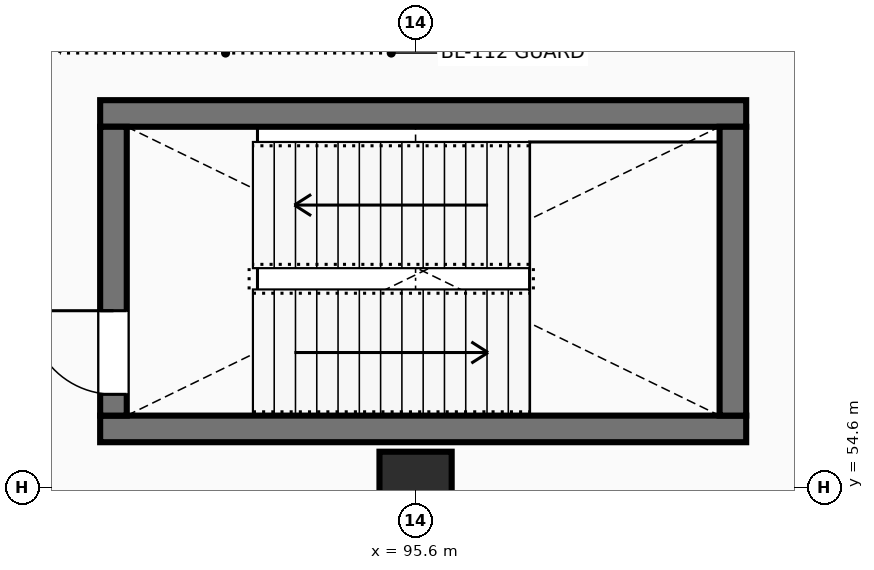
"""IFC4 building model, lengths in metres.
Left out: names, types, materials, properties, quantities, classifications, styles, units other than length and angle.
Written with IfcOpenShell. Run it as: python <this file> out.ifc"""

import sys

from ifc_helpers import new_model, si_unit, direction, frame, frame_2d, origin, origin_2d, place, context, subcontext, project, spatial, rectangle, extrude, element, fill, save


model = new_model("IFC4")
c1 = context("Model", 3, precision=1e-05, world=origin(), true_north=direction((0.0, 1.0)))
c2 = subcontext(c1, "Body", "Model", "MODEL_VIEW")
j1 = project(units=[si_unit("LENGTHUNIT", "METRE"), si_unit("PLANEANGLEUNIT", "RADIAN")], contexts=[c1])
p1 = place(None, origin())
s1 = spatial("IfcSite", under=j1, at=p1, CompositionType="ELEMENT")
p2 = place(p1, origin())
s2 = spatial("IfcBuilding", under=s1, at=p2, CompositionType="ELEMENT")
p3 = place(p2, frame((0.0, 0.0, 5.4)))
s3 = spatial("IfcBuildingStorey", under=s2, at=p3, CompositionType="ELEMENT", Elevation=5.4)
p4 = place(p3, frame((95.6, 54.6, 0.0), z_axis=(0.0, 0.0, 1.0), x_axis=(1.0, 0.0, 0.0)))
e1 = element("IfcColumn", 1, at=p4, inside=s3, PredefinedType="COLUMN", context=c2, shape_type="SweptSolid", body=[
    extrude(rectangle(XDim=0.95, YDim=0.95, at=origin_2d()), origin(), (0.0, 0.0, 1.0), 4.8),
])
for number, where, z_axis, x_axis in (
    (2, (91.45, 55.375, 0.0), (0.0, 0.0, 1.0), (1.0, 0.0, 0.0)),
    (3, (99.95, 59.525, 0.0), (0.0, 0.0, 1.0), (-1.0, 0.0, 0.0)),
):
    element("IfcWall", number, at=place(p3, frame(where, z_axis=z_axis, x_axis=x_axis)), inside=s3, PredefinedType="SHEAR", context=c2, shape_type="SweptSolid", body=[
        extrude(rectangle(XDim=8.5, YDim=0.35, at=frame_2d((4.25, 0.0))), origin(), (0.0, 0.0, 1.0), 4.48),
    ])
p5 = place(p3, frame((91.625, 55.55, 0.0), z_axis=(0.0, 0.0, 1.0), x_axis=(0.0, 1.0, 0.0)))
e4 = element("IfcWall", 4, at=p5, inside=s3, PredefinedType="SHEAR", context=c2, shape_type="SweptSolid", body=[
    extrude(rectangle(XDim=3.8, YDim=0.35, at=frame_2d((1.9, 0.0))), origin(), (0.0, 0.0, 1.0), 4.48),
])
p6 = place(p5, frame((0.28, 0.0, 0.0)))
e5 = element("IfcOpeningElement", 5, at=p6, cuts=e4, PredefinedType="OPENING", context=c2, shape_type="SweptSolid", body=[
    extrude(rectangle(XDim=1.1, YDim=2.08, at=frame_2d((0.55, 1.04))), frame((0.0, 0.185, 0.0), z_axis=(0.0, -1.0, 0.0), x_axis=(1.0, 0.0, 0.0)), (0.0, 0.0, 1.0), 0.37),
])
p7 = place(p3, frame((99.775, 59.35, 0.0), z_axis=(0.0, 0.0, 1.0), x_axis=(0.0, -1.0, 0.0)))
e6 = element("IfcWall", 6, at=p7, inside=s3, PredefinedType="SHEAR", context=c2, shape_type="SweptSolid", body=[
    extrude(rectangle(XDim=3.8, YDim=0.35, at=frame_2d((1.9, 0.0))), origin(), (0.0, 0.0, 1.0), 4.48),
])
p8 = place(p6, origin())
e7 = element("IfcDoor", 7, at=p8, inside=s3, OperationType="SINGLE_SWING_RIGHT", PredefinedType="DOOR", context=c2, shape_type="SweptSolid", body=[
    extrude(rectangle(XDim=1.1, YDim=2.08, at=frame_2d((0.55, 1.04))), frame((0.0, 0.025, 0.0), z_axis=(0.0, -1.0, 0.0), x_axis=(1.0, 0.0, 0.0)), (0.0, 0.0, 1.0), 0.05),
])
fill(e5, e7)
save(model, sys.argv[1])
